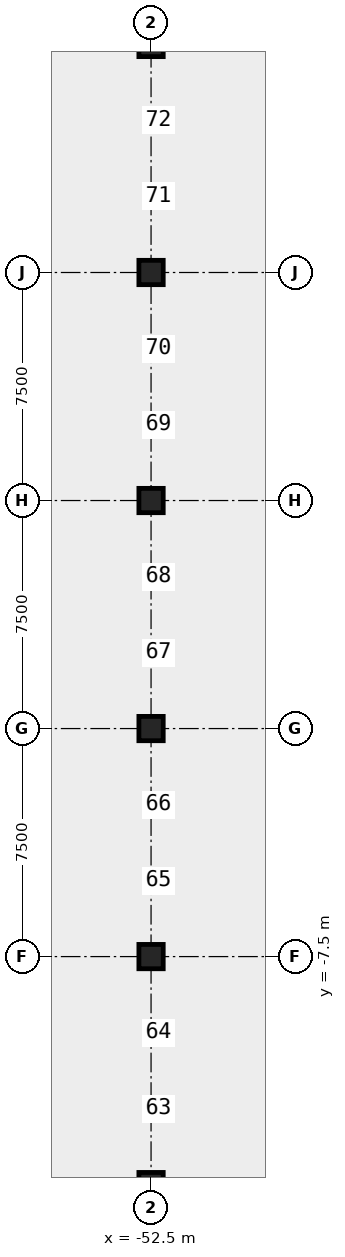
"""IFC4 building model, lengths in metres.
Left out: names, types, materials, properties, quantities, classifications, styles, units other than length and angle.
Written with IfcOpenShell. Run it as: python <this file> out.ifc"""

import sys

from ifc_helpers import new_model, si_unit, direction, frame, origin, origin_2d, place, context, subcontext, project, spatial, rectangle, extrude, element, save


model = new_model("IFC4")
c1 = context("Model", 3, precision=1e-05, world=origin(), true_north=direction((0.0, 1.0)))
c2 = subcontext(c1, "Body", "Model", "MODEL_VIEW")
j1 = project(units=[si_unit("LENGTHUNIT", "METRE"), si_unit("PLANEANGLEUNIT", "RADIAN")], contexts=[c1])
p1 = place(None, origin())
s1 = spatial("IfcSite", under=j1, at=p1, CompositionType="ELEMENT")
p2 = place(p1, origin())
s2 = spatial("IfcBuilding", under=s1, at=p2, CompositionType="ELEMENT")
p3 = place(p2, frame((0.0, 0.0, -5.5)))
s3 = spatial("IfcBuildingStorey", under=s2, at=p3, CompositionType="ELEMENT", Elevation=-5.5)
for number, where, z_axis, x_axis in (
    (1, (-52.5, -15.0, -0.42), (0.0, 0.0, 1.0), (1.0, 0.0, 0.0)),
    (2, (-52.5, -7.5, -0.42), (0.0, 0.0, 1.0), (1.0, 0.0, 0.0)),
    (3, (-52.5, 0.0, -0.42), (0.0, 0.0, 1.0), (1.0, 0.0, 0.0)),
    (4, (-52.5, 7.5, -0.42), (0.0, 0.0, 1.0), (1.0, 0.0, 0.0)),
    (5, (-52.5, 15.0, -0.42), (0.0, 0.0, 1.0), (1.0, 0.0, 0.0)),
    (6, (-52.5, 22.5, -0.42), (0.0, 0.0, 1.0), (1.0, 0.0, 0.0)),
):
    element("IfcColumn", number, at=place(p3, frame(where, z_axis=z_axis, x_axis=x_axis)), inside=s3, PredefinedType="COLUMN", context=c2, shape_type="SweptSolid", body=[
        extrude(rectangle(XDim=0.8, YDim=0.8, at=origin_2d()), origin(), (0.0, 0.0, 1.0), 5.72),
    ])
save(model, sys.argv[1])
